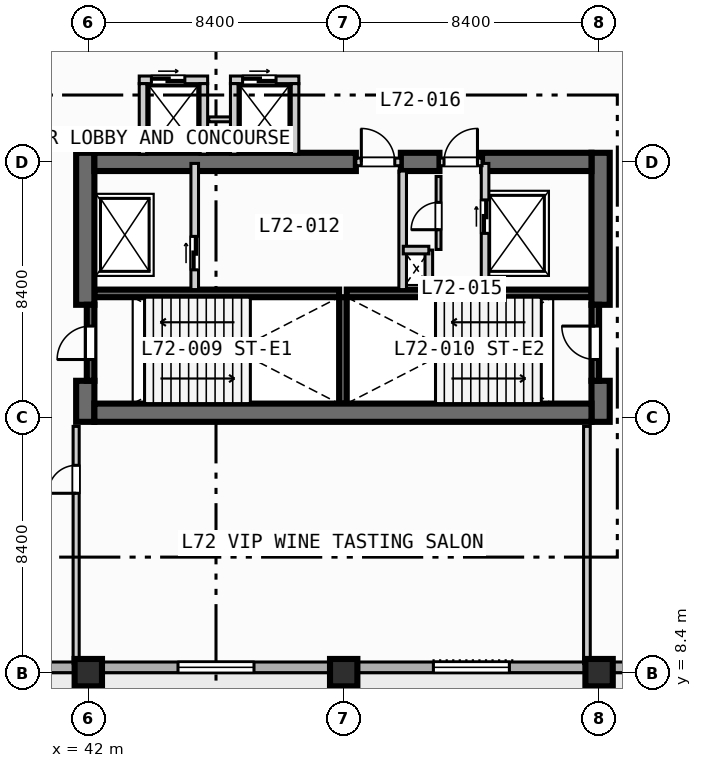
"""IFC4 building model, lengths in metres.
Left out: names, types, materials, properties, quantities, classifications, styles, units other than length and angle.
Written with IfcOpenShell. Run it as: python <this file> out.ifc"""

import sys

from ifc_helpers import new_model, si_unit, direction, frame, frame_2d, origin, origin_2d, place, context, subcontext, project, spatial, rectangle, extrude, element, fill, save


model = new_model("IFC4")
c1 = context("Model", 3, precision=1e-05, world=origin(), true_north=direction((0.0, 1.0)))
c2 = subcontext(c1, "Body", "Model", "MODEL_VIEW")
j1 = project(units=[si_unit("LENGTHUNIT", "METRE"), si_unit("PLANEANGLEUNIT", "RADIAN")], contexts=[c1])
p1 = place(None, origin())
s1 = spatial("IfcSite", under=j1, at=p1, CompositionType="ELEMENT")
p2 = place(p1, origin())
s2 = spatial("IfcBuilding", under=s1, at=p2, CompositionType="ELEMENT")
p3 = place(p2, frame((0.0, 0.0, 290.4)))
s3 = spatial("IfcBuildingStorey", under=s2, at=p3, CompositionType="ELEMENT", Elevation=290.4)
for number, where, z_axis, x_axis in (
    (1, (42.2, 20.875, 0.0), (0.0, 0.0, 1.0), (1.0, 0.0, 0.0)),
    (2, (50.5, 20.875, 0.0), (0.0, 0.0, 1.0), (1.0, 0.0, 0.0)),
):
    element("IfcWall", number, at=place(p3, frame(where, z_axis=z_axis, x_axis=x_axis)), inside=s3, PredefinedType="SOLIDWALL", context=c2, shape_type="SweptSolid", body=[
        extrude(rectangle(XDim=8.05, YDim=0.25, at=frame_2d((4.025, 0.0))), origin(), (0.0, 0.0, 1.0), 4.05),
    ])
p4 = place(p3, frame((50.375, 17.25, 0.0), z_axis=(0.0, 0.0, 1.0), x_axis=(0.0, 1.0, 0.0)))
e3 = element("IfcWall", 3, at=p4, inside=s3, PredefinedType="SOLIDWALL", context=c2, shape_type="SweptSolid", body=[
    extrude(rectangle(XDim=3.5, YDim=0.25, at=frame_2d((1.75, 0.0))), origin(), (0.0, 0.0, 1.0), 4.05),
])
p5 = place(p3, frame((41.9, 16.65, 0.0), z_axis=(0.0, 0.0, 1.0), x_axis=(0.0, 1.0, 0.0)))
e4 = element("IfcWall", 4, at=p5, inside=s3, PredefinedType="SHEAR", context=c2, shape_type="SweptSolid", body=[
    extrude(rectangle(XDim=1.35, YDim=0.6, at=frame_2d((0.675, 0.0))), origin(), (0.0, 0.0, 1.0), 4.05),
])
p6 = place(p3, frame((41.9, 20.5, 0.0), z_axis=(0.0, 0.0, 1.0), x_axis=(0.0, 1.0, 0.0)))
e5 = element("IfcWall", 5, at=p6, inside=s3, PredefinedType="SHEAR", context=c2, shape_type="SweptSolid", body=[
    extrude(rectangle(XDim=5.0, YDim=0.6, at=frame_2d((2.5, 0.0))), origin(), (0.0, 0.0, 1.0), 4.05),
])
p7 = place(p3, frame((58.85, 16.65, 0.0), z_axis=(0.0, 0.0, 1.0), x_axis=(0.0, 1.0, 0.0)))
e6 = element("IfcWall", 6, at=p7, inside=s3, PredefinedType="SHEAR", context=c2, shape_type="SweptSolid", body=[
    extrude(rectangle(XDim=1.35, YDim=0.6, at=frame_2d((0.675, 0.0))), origin(), (0.0, 0.0, 1.0), 4.05),
])
p8 = place(p3, frame((58.85, 20.5, 0.0), z_axis=(0.0, 0.0, 1.0), x_axis=(0.0, 1.0, 0.0)))
e7 = element("IfcWall", 7, at=p8, inside=s3, PredefinedType="SHEAR", context=c2, shape_type="SweptSolid", body=[
    extrude(rectangle(XDim=5.0, YDim=0.6, at=frame_2d((2.5, 0.0))), origin(), (0.0, 0.0, 1.0), 4.05),
])
p9 = place(p3, frame((42.2, 16.95, 0.0), z_axis=(0.0, 0.0, 1.0), x_axis=(1.0, 0.0, 0.0)))
e8 = element("IfcWall", 8, at=p9, inside=s3, PredefinedType="SHEAR", context=c2, shape_type="SweptSolid", body=[
    extrude(rectangle(XDim=16.35, YDim=0.6, at=frame_2d((8.175, 0.0))), origin(), (0.0, 0.0, 1.0), 4.05),
])
p10 = place(p3, frame((42.2, 25.2, 0.0), z_axis=(0.0, 0.0, 1.0), x_axis=(1.0, 0.0, 0.0)))
e9 = element("IfcWall", 9, at=p10, inside=s3, PredefinedType="SHEAR", context=c2, shape_type="SweptSolid", body=[
    extrude(rectangle(XDim=8.6, YDim=0.6, at=frame_2d((4.3, 0.0))), origin(), (0.0, 0.0, 1.0), 4.05),
])
p11 = place(p3, frame((52.28, 25.2, 0.0), z_axis=(0.0, 0.0, 1.0), x_axis=(1.0, 0.0, 0.0)))
e10 = element("IfcWall", 10, at=p11, inside=s3, PredefinedType="SHEAR", context=c2, shape_type="SweptSolid", body=[
    extrude(rectangle(XDim=1.27, YDim=0.6, at=frame_2d((0.635, 0.0))), origin(), (0.0, 0.0, 1.0), 4.05),
])
p12 = place(p3, frame((54.95, 25.2, 0.0), z_axis=(0.0, 0.0, 1.0), x_axis=(1.0, 0.0, 0.0)))
e11 = element("IfcWall", 11, at=p12, inside=s3, PredefinedType="SHEAR", context=c2, shape_type="SweptSolid", body=[
    extrude(rectangle(XDim=3.6, YDim=0.6, at=frame_2d((1.8, 0.0))), origin(), (0.0, 0.0, 1.0), 4.05),
])
for number, where, z_axis, x_axis in (
    (12, (42.0, 8.4, 0.0), (0.0, 0.0, 1.0), (1.0, 0.0, 0.0)),
    (13, (50.4, 8.4, 0.0), (0.0, 0.0, 1.0), (1.0, 0.0, 0.0)),
    (14, (58.8, 8.4, 0.0), (0.0, 0.0, 1.0), (1.0, 0.0, 0.0)),
):
    element("IfcColumn", number, at=place(p3, frame(where, z_axis=z_axis, x_axis=x_axis)), inside=s3, PredefinedType="COLUMN", context=c2, shape_type="SweptSolid", body=[
        extrude(rectangle(XDim=0.9, YDim=0.9, at=origin_2d()), origin(), (0.0, 0.0, 1.0), 4.4),
    ])
p13 = place(p3, frame((64.025, 8.575, 0.0), z_axis=(0.0, 0.0, 1.0), x_axis=(-1.0, 0.0, 0.0)))
e15 = element("IfcWall", 15, at=p13, inside=s3, PredefinedType="STANDARD", context=c2, shape_type="SweptSolid", body=[
    extrude(rectangle(XDim=52.45, YDim=0.35, at=frame_2d((26.225, 0.0))), origin(), (0.0, 0.0, 1.0), 4.05),
])
p14 = place(p13, frame((33.925, 0.0, 0.0)))
e16 = element("IfcOpeningElement", 16, at=p14, cuts=e15, PredefinedType="OPENING", context=c2, shape_type="SweptSolid", body=[
    extrude(rectangle(XDim=1.4, YDim=2.2, at=frame_2d((0.7, 1.1))), frame((0.0, 0.185, 0.0), z_axis=(0.0, -1.0, 0.0), x_axis=(1.0, 0.0, 0.0)), (0.0, 0.0, 1.0), 0.37),
])
p15 = place(p13, frame((16.575, 0.0, 0.85)))
e17 = element("IfcOpeningElement", 17, at=p15, cuts=e15, PredefinedType="OPENING", context=c2, shape_type="SweptSolid", body=[
    extrude(rectangle(XDim=2.5, YDim=2.2, at=frame_2d((1.25, 1.1))), frame((0.0, 0.185, 0.0), z_axis=(0.0, -1.0, 0.0), x_axis=(1.0, 0.0, 0.0)), (0.0, 0.0, 1.0), 0.37),
])
p16 = place(p13, frame((8.175, 0.0, 0.85)))
e18 = element("IfcOpeningElement", 18, at=p16, cuts=e15, PredefinedType="OPENING", context=c2, shape_type="SweptSolid", body=[
    extrude(rectangle(XDim=2.5, YDim=2.2, at=frame_2d((1.25, 1.1))), frame((0.0, 0.185, 0.0), z_axis=(0.0, -1.0, 0.0), x_axis=(1.0, 0.0, 0.0)), (0.0, 0.0, 1.0), 0.37),
])
p17 = place(p3, frame((42.075, 18.0, 0.0), z_axis=(0.0, 0.0, 1.0), x_axis=(0.0, 1.0, 0.0)))
e19 = element("IfcWall", 19, at=p17, inside=s3, PredefinedType="SOLIDWALL", context=c2, shape_type="SweptSolid", body=[
    extrude(rectangle(XDim=2.5, YDim=0.25, at=frame_2d((1.25, 0.0))), origin(), (0.0, 0.0, 1.0), 4.05),
])
p18 = place(p17, frame((0.7, 0.0, 0.0)))
e20 = element("IfcOpeningElement", 20, at=p18, cuts=e19, PredefinedType="OPENING", context=c2, shape_type="SweptSolid", body=[
    extrude(rectangle(XDim=1.1, YDim=2.15, at=frame_2d((0.55, 1.075))), frame((0.0, 0.135, 0.0), z_axis=(0.0, -1.0, 0.0), x_axis=(1.0, 0.0, 0.0)), (0.0, 0.0, 1.0), 0.27),
])
p19 = place(p3, frame((58.675, 18.0, 0.0), z_axis=(0.0, 0.0, 1.0), x_axis=(0.0, 1.0, 0.0)))
e21 = element("IfcWall", 21, at=p19, inside=s3, PredefinedType="SOLIDWALL", context=c2, shape_type="SweptSolid", body=[
    extrude(rectangle(XDim=2.5, YDim=0.25, at=frame_2d((1.25, 0.0))), origin(), (0.0, 0.0, 1.0), 4.05),
])
p20 = place(p19, frame((0.7, 0.0, 0.0)))
e22 = element("IfcOpeningElement", 22, at=p20, cuts=e21, PredefinedType="OPENING", context=c2, shape_type="SweptSolid", body=[
    extrude(rectangle(XDim=1.1, YDim=2.15, at=frame_2d((0.55, 1.075))), frame((0.0, 0.135, 0.0), z_axis=(0.0, -1.0, 0.0), x_axis=(1.0, 0.0, 0.0)), (0.0, 0.0, 1.0), 0.27),
])
p21 = place(p3, frame((45.5, 21.0, 0.0), z_axis=(0.0, 0.0, 1.0), x_axis=(0.0, 1.0, 0.0)))
e23 = element("IfcWall", 23, at=p21, inside=s3, PredefinedType="SOLIDWALL", context=c2, shape_type="SweptSolid", body=[
    extrude(rectangle(XDim=4.15, YDim=0.25, at=frame_2d((2.075, 0.0))), origin(), (0.0, 0.0, 1.0), 4.05),
])
p22 = place(p21, frame((0.65, 0.0, 0.0)))
e24 = element("IfcOpeningElement", 24, at=p22, cuts=e23, PredefinedType="OPENING", context=c2, shape_type="SweptSolid", body=[
    extrude(rectangle(XDim=1.1, YDim=2.15, at=frame_2d((0.55, 1.075))), frame((0.0, 0.135, 0.0), z_axis=(0.0, -1.0, 0.0), x_axis=(1.0, 0.0, 0.0)), (0.0, 0.0, 1.0), 0.27),
])
p23 = place(p3, frame((50.8, 25.2, 0.0), z_axis=(0.0, 0.0, 1.0), x_axis=(1.0, 0.0, 0.0)))
e25 = element("IfcWall", 25, at=p23, inside=s3, PredefinedType="SOLIDWALL", context=c2, shape_type="SweptSolid", body=[
    extrude(rectangle(XDim=1.48, YDim=0.25, at=frame_2d((0.74, 0.0))), origin(), (0.0, 0.0, 1.0), 4.05),
])
p24 = place(p23, frame((0.18, 0.0, 0.0)))
e26 = element("IfcOpeningElement", 26, at=p24, cuts=e25, PredefinedType="OPENING", context=c2, shape_type="SweptSolid", body=[
    extrude(rectangle(XDim=1.1, YDim=2.15, at=frame_2d((0.55, 1.075))), frame((0.0, 0.135, 0.0), z_axis=(0.0, -1.0, 0.0), x_axis=(1.0, 0.0, 0.0)), (0.0, 0.0, 1.0), 0.27),
])
p25 = place(p3, frame((52.34, 21.0, 0.0), z_axis=(0.0, 0.0, 1.0), x_axis=(0.0, 1.0, 0.0)))
e27 = element("IfcWall", 27, at=p25, inside=s3, PredefinedType="SOLIDWALL", context=c2, shape_type="SweptSolid", body=[
    extrude(rectangle(XDim=3.9, YDim=0.25, at=frame_2d((1.95, 0.0))), origin(), (0.0, 0.0, 1.0), 4.05),
])
p26 = place(p3, frame((55.05, 21.0, 0.0), z_axis=(0.0, 0.0, 1.0), x_axis=(0.0, 1.0, 0.0)))
e28 = element("IfcWall", 28, at=p26, inside=s3, PredefinedType="SOLIDWALL", context=c2, shape_type="SweptSolid", body=[
    extrude(rectangle(XDim=4.15, YDim=0.25, at=frame_2d((2.075, 0.0))), origin(), (0.0, 0.0, 1.0), 4.05),
])
p27 = place(p26, frame((1.85, 0.0, 0.0)))
e29 = element("IfcOpeningElement", 29, at=p27, cuts=e28, PredefinedType="OPENING", context=c2, shape_type="SweptSolid", body=[
    extrude(rectangle(XDim=1.1, YDim=2.15, at=frame_2d((0.55, 1.075))), frame((0.0, 0.135, 0.0), z_axis=(0.0, -1.0, 0.0), x_axis=(1.0, 0.0, 0.0)), (0.0, 0.0, 1.0), 0.27),
])
p28 = place(p3, frame((53.55, 25.2, 0.0), z_axis=(0.0, 0.0, 1.0), x_axis=(1.0, 0.0, 0.0)))
e30 = element("IfcWall", 30, at=p28, inside=s3, PredefinedType="SOLIDWALL", context=c2, shape_type="SweptSolid", body=[
    extrude(rectangle(XDim=1.4, YDim=0.25, at=frame_2d((0.7, 0.0))), origin(), (0.0, 0.0, 1.0), 4.05),
])
p29 = place(p28, frame((0.15, 0.0, 0.0)))
e31 = element("IfcOpeningElement", 31, at=p29, cuts=e30, PredefinedType="OPENING", context=c2, shape_type="SweptSolid", body=[
    extrude(rectangle(XDim=1.1, YDim=2.15, at=frame_2d((0.55, 1.075))), frame((0.0, 0.135, 0.0), z_axis=(0.0, -1.0, 0.0), x_axis=(1.0, 0.0, 0.0)), (0.0, 0.0, 1.0), 0.27),
])
p30 = place(p3, frame((53.2, 21.0, 0.0), z_axis=(0.0, 0.0, 1.0), x_axis=(0.0, 1.0, 0.0)))
e32 = element("IfcWall", 32, at=p30, inside=s3, PredefinedType="SOLIDWALL", context=c2, shape_type="SweptSolid", body=[
    extrude(rectangle(XDim=1.3, YDim=0.25, at=frame_2d((0.65, 0.0))), origin(), (0.0, 0.0, 1.0), 4.05),
])
p31 = place(p3, frame((52.36, 22.3, 0.0), z_axis=(0.0, 0.0, 1.0), x_axis=(1.0, 0.0, 0.0)))
e33 = element("IfcWall", 33, at=p31, inside=s3, PredefinedType="SOLIDWALL", context=c2, shape_type="SweptSolid", body=[
    extrude(rectangle(XDim=0.84, YDim=0.25, at=frame_2d((0.42, 0.0))), origin(), (0.0, 0.0, 1.0), 4.05),
])
p32 = place(p3, frame((53.52, 22.32, 0.0), z_axis=(0.0, 0.0, 1.0), x_axis=(0.0, 1.0, 0.0)))
e34 = element("IfcWall", 34, at=p32, inside=s3, PredefinedType="PARTITIONING", context=c2, shape_type="SweptSolid", body=[
    extrude(rectangle(XDim=2.4, YDim=0.16, at=frame_2d((1.2, 0.0))), origin(), (0.0, 0.0, 1.0), 4.05),
])
p33 = place(p32, frame((0.65, 0.0, 0.0)))
e35 = element("IfcOpeningElement", 35, at=p33, cuts=e34, PredefinedType="OPENING", context=c2, shape_type="SweptSolid", body=[
    extrude(rectangle(XDim=0.9, YDim=2.1, at=frame_2d((0.45, 1.05))), frame((0.0, 0.09, 0.0), z_axis=(0.0, -1.0, 0.0), x_axis=(1.0, 0.0, 0.0)), (0.0, 0.0, 1.0), 0.18),
])
p34 = place(p3, frame((43.675, 27.9, 0.0), z_axis=(0.0, 0.0, 1.0), x_axis=(1.0, 0.0, 0.0)))
e36 = element("IfcWall", 36, at=p34, inside=s3, PredefinedType="SOLIDWALL", context=c2, shape_type="SweptSolid", body=[
    extrude(rectangle(XDim=2.25, YDim=0.25, at=frame_2d((1.125, 0.0))), origin(), (0.0, 0.0, 1.0), 4.05),
])
p35 = place(p34, frame((0.4, 0.0, 0.0)))
e37 = element("IfcOpeningElement", 37, at=p35, cuts=e36, PredefinedType="OPENING", context=c2, shape_type="SweptSolid", body=[
    extrude(rectangle(XDim=1.1, YDim=2.15, at=frame_2d((0.55, 1.075))), frame((0.0, 0.135, 0.0), z_axis=(0.0, -1.0, 0.0), x_axis=(1.0, 0.0, 0.0)), (0.0, 0.0, 1.0), 0.27),
])
for number, where, z_axis, x_axis in (
    (38, (43.8, 25.45, 0.0), (0.0, 0.0, 1.0), (0.0, 1.0, 0.0)),
    (39, (45.8, 25.45, 0.0), (0.0, 0.0, 1.0), (0.0, 1.0, 0.0)),
):
    element("IfcWall", number, at=place(p3, frame(where, z_axis=z_axis, x_axis=x_axis)), inside=s3, PredefinedType="SOLIDWALL", context=c2, shape_type="SweptSolid", body=[
        extrude(rectangle(XDim=2.325, YDim=0.25, at=frame_2d((1.163, 0.0))), origin(), (0.0, 0.0, 1.0), 4.05),
    ])
p36 = place(p3, frame((45.96, 26.6, 0.0), z_axis=(0.0, 0.0, 1.0), x_axis=(1.0, 0.0, 0.0)))
e40 = element("IfcWall", 40, at=p36, inside=s3, PredefinedType="PARTITIONING", context=c2, shape_type="SweptSolid", body=[
    extrude(rectangle(XDim=0.88, YDim=0.16, at=frame_2d((0.44, 0.0))), origin(), (0.0, 0.0, 1.0), 4.05),
])
p37 = place(p3, frame((46.675, 27.9, 0.0), z_axis=(0.0, 0.0, 1.0), x_axis=(1.0, 0.0, 0.0)))
e41 = element("IfcWall", 41, at=p37, inside=s3, PredefinedType="SOLIDWALL", context=c2, shape_type="SweptSolid", body=[
    extrude(rectangle(XDim=2.25, YDim=0.25, at=frame_2d((1.125, 0.0))), origin(), (0.0, 0.0, 1.0), 4.05),
])
p38 = place(p37, frame((0.4, 0.0, 0.0)))
e42 = element("IfcOpeningElement", 42, at=p38, cuts=e41, PredefinedType="OPENING", context=c2, shape_type="SweptSolid", body=[
    extrude(rectangle(XDim=1.1, YDim=2.15, at=frame_2d((0.55, 1.075))), frame((0.0, 0.135, 0.0), z_axis=(0.0, -1.0, 0.0), x_axis=(1.0, 0.0, 0.0)), (0.0, 0.0, 1.0), 0.27),
])
for number, where, z_axis, x_axis in (
    (43, (46.8, 25.45, 0.0), (0.0, 0.0, 1.0), (0.0, 1.0, 0.0)),
    (44, (48.8, 25.45, 0.0), (0.0, 0.0, 1.0), (0.0, 1.0, 0.0)),
):
    element("IfcWall", number, at=place(p3, frame(where, z_axis=z_axis, x_axis=x_axis)), inside=s3, PredefinedType="SOLIDWALL", context=c2, shape_type="SweptSolid", body=[
        extrude(rectangle(XDim=2.325, YDim=0.25, at=frame_2d((1.163, 0.0))), origin(), (0.0, 0.0, 1.0), 4.05),
    ])
p39 = place(p3, frame((41.6, 8.7, 0.0), z_axis=(0.0, 0.0, 1.0), x_axis=(0.0, 1.0, 0.0)))
e45 = element("IfcWall", 45, at=p39, inside=s3, PredefinedType="PARTITIONING", context=c2, shape_type="SweptSolid", body=[
    extrude(rectangle(XDim=7.8, YDim=0.2, at=frame_2d((3.9, 0.0))), origin(), (0.0, 0.0, 1.0), 4.05),
])
p40 = place(p39, frame((5.6, 0.0, 0.0)))
e46 = element("IfcOpeningElement", 46, at=p40, cuts=e45, PredefinedType="OPENING", context=c2, shape_type="SweptSolid", body=[
    extrude(rectangle(XDim=0.92, YDim=2.1, at=frame_2d((0.46, 1.05))), frame((0.0, 0.11, 0.0), z_axis=(0.0, -1.0, 0.0), x_axis=(1.0, 0.0, 0.0)), (0.0, 0.0, 1.0), 0.22),
])
p41 = place(p3, frame((58.4, 8.7, 0.0), z_axis=(0.0, 0.0, 1.0), x_axis=(0.0, 1.0, 0.0)))
e47 = element("IfcWall", 47, at=p41, inside=s3, PredefinedType="PARTITIONING", context=c2, shape_type="SweptSolid", body=[
    extrude(rectangle(XDim=7.8, YDim=0.22, at=frame_2d((3.9, 0.0))), origin(), (0.0, 0.0, 1.0), 4.05),
])
p42 = place(p15, origin())
e48 = element("IfcWindow", 48, at=p42, inside=s3, PartitioningType="SINGLE_PANEL", PredefinedType="WINDOW", context=c2, shape_type="SweptSolid", body=[
    extrude(rectangle(XDim=2.5, YDim=2.2, at=frame_2d((1.25, 1.1))), frame((0.0, 0.03, 0.0), z_axis=(0.0, -1.0, 0.0), x_axis=(1.0, 0.0, 0.0)), (0.0, 0.0, 1.0), 0.06),
])
fill(e17, e48)
p43 = place(p16, origin())
e49 = element("IfcWindow", 49, at=p43, inside=s3, PartitioningType="SINGLE_PANEL", PredefinedType="WINDOW", context=c2, shape_type="SweptSolid", body=[
    extrude(rectangle(XDim=2.5, YDim=2.2, at=frame_2d((1.25, 1.1))), frame((0.0, 0.03, 0.0), z_axis=(0.0, -1.0, 0.0), x_axis=(1.0, 0.0, 0.0)), (0.0, 0.0, 1.0), 0.06),
])
fill(e18, e49)
p44 = place(p18, origin())
e50 = element("IfcDoor", 50, at=p44, inside=s3, OperationType="SINGLE_SWING_LEFT", PredefinedType="DOOR", context=c2, shape_type="SweptSolid", body=[
    extrude(rectangle(XDim=1.1, YDim=2.15, at=frame_2d((0.55, 1.075))), frame((0.0, 0.025, 0.0), z_axis=(0.0, -1.0, 0.0), x_axis=(1.0, 0.0, 0.0)), (0.0, 0.0, 1.0), 0.05),
])
fill(e20, e50)
p45 = place(p20, origin())
e51 = element("IfcDoor", 51, at=p45, inside=s3, OperationType="SINGLE_SWING_RIGHT", PredefinedType="DOOR", context=c2, shape_type="SweptSolid", body=[
    extrude(rectangle(XDim=1.1, YDim=2.15, at=frame_2d((0.55, 1.075))), frame((0.0, 0.025, 0.0), z_axis=(0.0, -1.0, 0.0), x_axis=(1.0, 0.0, 0.0)), (0.0, 0.0, 1.0), 0.05),
])
fill(e22, e51)
p46 = place(p22, origin())
e52 = element("IfcDoor", 52, at=p46, inside=s3, OperationType="SLIDING_TO_LEFT", PredefinedType="DOOR", context=c2, shape_type="SweptSolid", body=[
    extrude(rectangle(XDim=1.1, YDim=2.15, at=frame_2d((0.55, 1.075))), frame((0.0, 0.025, 0.0), z_axis=(0.0, -1.0, 0.0), x_axis=(1.0, 0.0, 0.0)), (0.0, 0.0, 1.0), 0.05),
])
fill(e24, e52)
p47 = place(p24, origin())
e53 = element("IfcDoor", 53, at=p47, inside=s3, OperationType="SINGLE_SWING_LEFT", PredefinedType="DOOR", context=c2, shape_type="SweptSolid", body=[
    extrude(rectangle(XDim=1.1, YDim=2.15, at=frame_2d((0.55, 1.075))), frame((0.0, 0.025, 0.0), z_axis=(0.0, -1.0, 0.0), x_axis=(1.0, 0.0, 0.0)), (0.0, 0.0, 1.0), 0.05),
])
fill(e26, e53)
p48 = place(p27, origin())
e54 = element("IfcDoor", 54, at=p48, inside=s3, OperationType="SLIDING_TO_LEFT", PredefinedType="DOOR", context=c2, shape_type="SweptSolid", body=[
    extrude(rectangle(XDim=1.1, YDim=2.15, at=frame_2d((0.55, 1.075))), frame((0.0, 0.025, 0.0), z_axis=(0.0, -1.0, 0.0), x_axis=(1.0, 0.0, 0.0)), (0.0, 0.0, 1.0), 0.05),
])
fill(e29, e54)
p49 = place(p29, origin())
e55 = element("IfcDoor", 55, at=p49, inside=s3, OperationType="SINGLE_SWING_RIGHT", PredefinedType="DOOR", context=c2, shape_type="SweptSolid", body=[
    extrude(rectangle(XDim=1.1, YDim=2.15, at=frame_2d((0.55, 1.075))), frame((0.0, 0.025, 0.0), z_axis=(0.0, -1.0, 0.0), x_axis=(1.0, 0.0, 0.0)), (0.0, 0.0, 1.0), 0.05),
])
fill(e31, e55)
p50 = place(p33, origin())
e56 = element("IfcDoor", 56, at=p50, inside=s3, OperationType="SINGLE_SWING_LEFT", PredefinedType="DOOR", context=c2, shape_type="SweptSolid", body=[
    extrude(rectangle(XDim=0.9, YDim=2.1, at=frame_2d((0.45, 1.05))), frame((0.0, 0.025, 0.0), z_axis=(0.0, -1.0, 0.0), x_axis=(1.0, 0.0, 0.0)), (0.0, 0.0, 1.0), 0.05),
])
fill(e35, e56)
p51 = place(p35, origin())
e57 = element("IfcDoor", 57, at=p51, inside=s3, OperationType="SLIDING_TO_LEFT", PredefinedType="DOOR", context=c2, shape_type="SweptSolid", body=[
    extrude(rectangle(XDim=1.1, YDim=2.15, at=frame_2d((0.55, 1.075))), frame((0.0, 0.025, 0.0), z_axis=(0.0, -1.0, 0.0), x_axis=(1.0, 0.0, 0.0)), (0.0, 0.0, 1.0), 0.05),
])
fill(e37, e57)
p52 = place(p38, origin())
e58 = element("IfcDoor", 58, at=p52, inside=s3, OperationType="SLIDING_TO_LEFT", PredefinedType="DOOR", context=c2, shape_type="SweptSolid", body=[
    extrude(rectangle(XDim=1.1, YDim=2.15, at=frame_2d((0.55, 1.075))), frame((0.0, 0.025, 0.0), z_axis=(0.0, -1.0, 0.0), x_axis=(1.0, 0.0, 0.0)), (0.0, 0.0, 1.0), 0.05),
])
fill(e42, e58)
p53 = place(p40, origin())
e59 = element("IfcDoor", 59, at=p53, inside=s3, OperationType="SINGLE_SWING_LEFT", PredefinedType="DOOR", context=c2, shape_type="SweptSolid", body=[
    extrude(rectangle(XDim=0.92, YDim=2.1, at=frame_2d((0.46, 1.05))), frame((0.0, 0.025, 0.0), z_axis=(0.0, -1.0, 0.0), x_axis=(1.0, 0.0, 0.0)), (0.0, 0.0, 1.0), 0.05),
])
fill(e46, e59)
save(model, sys.argv[1])
